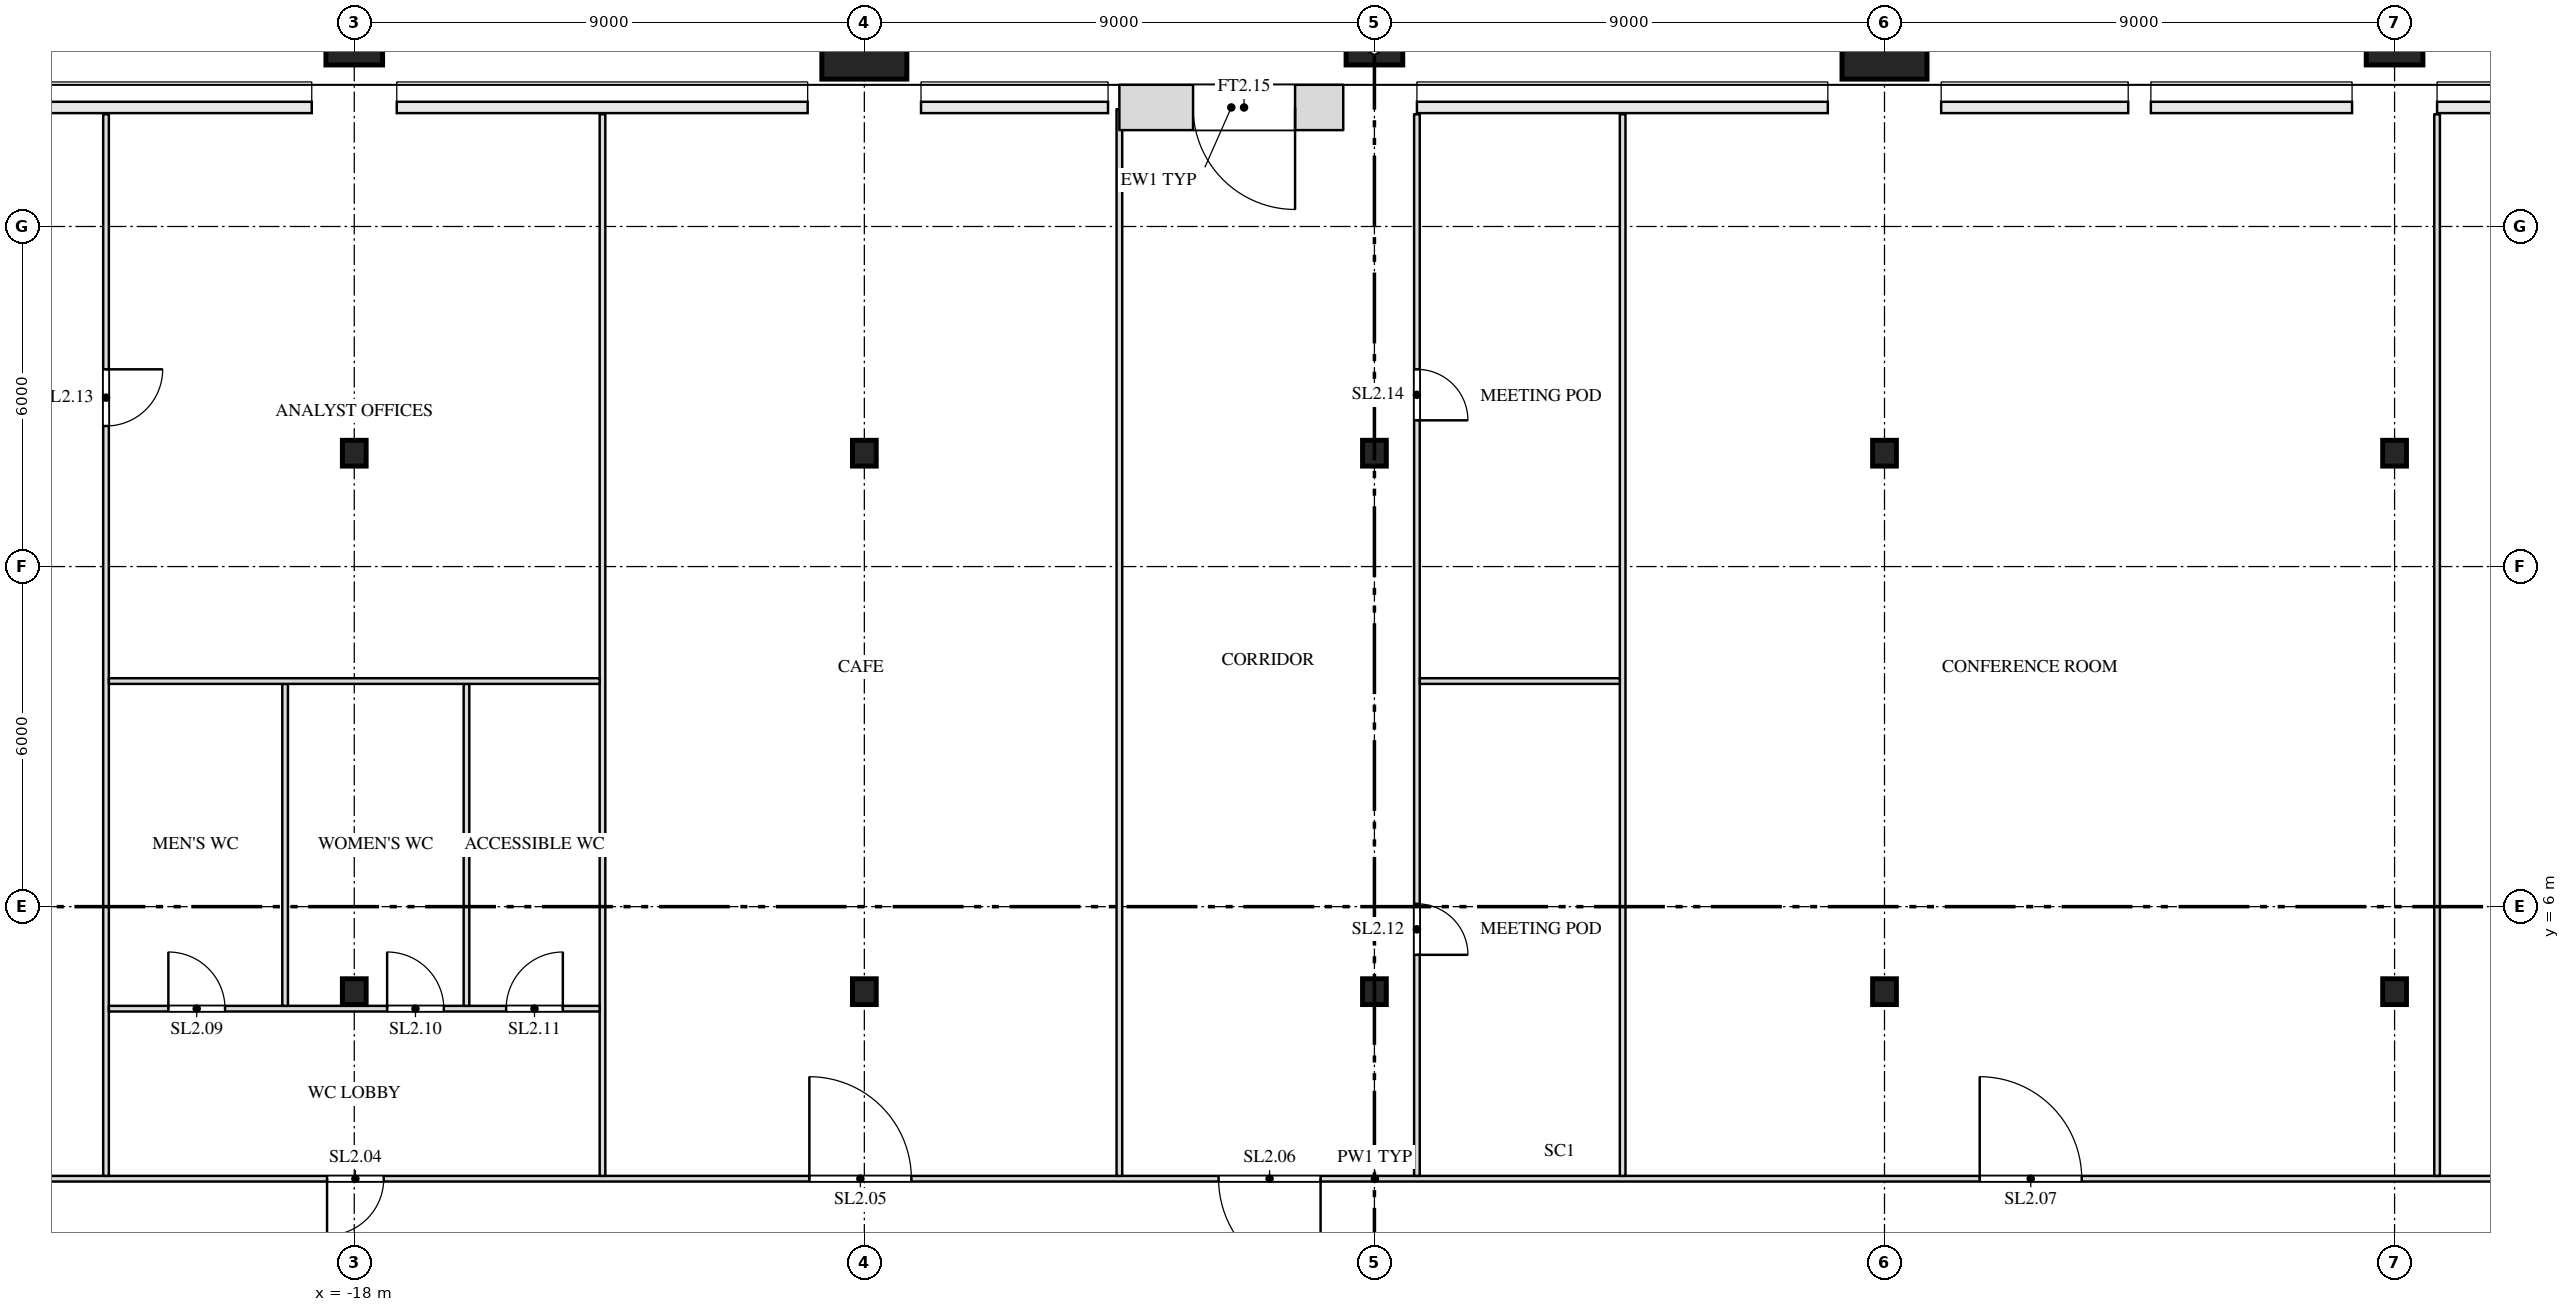
"""IFC4 building model, lengths in metres.
Left out: names, types, materials, properties, quantities, classifications, styles, units other than length and angle.
Written with IfcOpenShell. Run it as: python <this file> out.ifc"""

import sys

from ifc_helpers import new_model, si_unit, direction, frame, frame_2d, origin, origin_2d, place, context, subcontext, project, spatial, rectangle, i_section, extrude, clip, halfspace, element, fill, save


model = new_model("IFC4")
c1 = context("Model", 3, precision=1e-05, world=origin(), true_north=direction((0.0, 1.0)))
c2 = subcontext(c1, "Body", "Model", "MODEL_VIEW")
j1 = project(units=[si_unit("LENGTHUNIT", "METRE"), si_unit("PLANEANGLEUNIT", "RADIAN")], contexts=[c1])
p1 = place(None, origin())
s1 = spatial("IfcSite", under=j1, at=p1, CompositionType="ELEMENT")
p2 = place(p1, origin())
s2 = spatial("IfcBuilding", under=s1, at=p2, CompositionType="ELEMENT")
p3 = place(p2, frame((0.0, 0.0, 156.5)))
s3 = spatial("IfcBuildingStorey", under=s2, at=p3, CompositionType="ELEMENT", Elevation=156.5)
for number, where, z_axis, x_axis in (
    (1, (-18.0, 4.5, 0.0), (0.0, 0.0, 1.0), (1.0, 0.0, 0.0)),
    (2, (-9.0, 4.5, 0.0), (0.0, 0.0, 1.0), (1.0, 0.0, 0.0)),
    (3, (0.0, 4.5, 0.0), (0.0, 0.0, 1.0), (1.0, 0.0, 0.0)),
    (4, (9.0, 4.5, 0.0), (0.0, 0.0, 1.0), (1.0, 0.0, 0.0)),
    (5, (18.0, 4.5, 0.0), (0.0, 0.0, 1.0), (1.0, 0.0, 0.0)),
    (6, (-18.0, 14.0, 0.0), (0.0, 0.0, 1.0), (1.0, 0.0, 0.0)),
    (7, (-9.0, 14.0, 0.0), (0.0, 0.0, 1.0), (1.0, 0.0, 0.0)),
    (8, (0.0, 14.0, 0.0), (0.0, 0.0, 1.0), (1.0, 0.0, 0.0)),
    (9, (9.0, 14.0, 0.0), (0.0, 0.0, 1.0), (1.0, 0.0, 0.0)),
    (10, (18.0, 14.0, 0.0), (0.0, 0.0, 1.0), (1.0, 0.0, 0.0)),
):
    element("IfcColumn", number, at=place(p3, frame(where, z_axis=z_axis, x_axis=x_axis)), inside=s3, PredefinedType="COLUMN", context=c2, shape_type="SweptSolid", body=[
        extrude(i_section(OverallWidth=0.419, OverallDepth=0.455, WebThickness=0.042, FlangeThickness=0.068, at=origin_2d()), origin(), (0.0, 0.0, 1.0), 4.0),
    ])
p4 = place(p3, frame((-18.0, 20.0, 0.0), z_axis=(0.0, 0.747409318684, 0.66436383883), x_axis=(-1.0, 0.0, 0.0)))
e11 = element("IfcColumn", 11, at=p4, inside=s3, PredefinedType="COLUMN", context=c2, shape_type="Clipping", body=[
    clip(extrude(rectangle(XDim=1.0, YDim=1.0, at=origin_2d()), origin(), (0.0, 0.0, 1.0), 6.021), halfspace(frame((0.0, 0.0, 0.562)), True)),
])
p5 = place(p3, frame((-9.0, 20.0, 0.0), z_axis=(0.0, 0.747409318684, 0.66436383883), x_axis=(-1.0, 0.0, 0.0)))
e12 = element("IfcColumn", 12, at=p5, inside=s3, PredefinedType="COLUMN", context=c2, shape_type="Clipping", body=[
    clip(extrude(rectangle(XDim=1.5, YDim=1.5, at=origin_2d()), origin(), (0.0, 0.0, 1.0), 6.021), halfspace(frame((0.0, 0.0, 0.844)), True)),
])
p6 = place(p3, frame((0.0, 20.0, 0.0), z_axis=(0.0, 0.747409318684, 0.66436383883), x_axis=(-1.0, 0.0, 0.0)))
e13 = element("IfcColumn", 13, at=p6, inside=s3, PredefinedType="COLUMN", context=c2, shape_type="Clipping", body=[
    clip(extrude(rectangle(XDim=1.0, YDim=1.0, at=origin_2d()), origin(), (0.0, 0.0, 1.0), 6.021), halfspace(frame((0.0, 0.0, 0.562)), True)),
])
p7 = place(p3, frame((9.0, 20.0, 0.0), z_axis=(0.0, 0.747409318684, 0.66436383883), x_axis=(-1.0, 0.0, 0.0)))
e14 = element("IfcColumn", 14, at=p7, inside=s3, PredefinedType="COLUMN", context=c2, shape_type="Clipping", body=[
    clip(extrude(rectangle(XDim=1.5, YDim=1.5, at=origin_2d()), origin(), (0.0, 0.0, 1.0), 6.021), halfspace(frame((0.0, 0.0, 0.844)), True)),
])
p8 = place(p3, frame((18.0, 20.0, 0.0), z_axis=(0.0, 0.747409318684, 0.66436383883), x_axis=(-1.0, 0.0, 0.0)))
e15 = element("IfcColumn", 15, at=p8, inside=s3, PredefinedType="COLUMN", context=c2, shape_type="Clipping", body=[
    clip(extrude(rectangle(XDim=1.0, YDim=1.0, at=origin_2d()), origin(), (0.0, 0.0, 1.0), 6.021), halfspace(frame((0.0, 0.0, 0.562)), True)),
])
p9 = place(p3, frame((-33.98, 1.2, 0.0), z_axis=(0.0, 0.0, 1.0), x_axis=(1.0, 0.0, 0.0)))
e16 = element("IfcWall", 16, at=p9, inside=s3, PredefinedType="PARTITIONING", context=c2, shape_type="SweptSolid", body=[
    extrude(rectangle(XDim=67.976, YDim=0.1, at=frame_2d((33.988, 0.0))), origin(), (0.0, 0.0, 1.0), 3.65),
])
p10 = place(p9, frame((8.38, 0.0, 0.0)))
e17 = element("IfcOpeningElement", 17, at=p10, cuts=e16, PredefinedType="OPENING", context=c2, shape_type="SweptSolid", body=[
    extrude(rectangle(XDim=1.8, YDim=2.1, at=frame_2d((0.9, 1.05))), frame((0.0, 0.062, 0.0), z_axis=(0.0, -1.0, 0.0), x_axis=(1.0, 0.0, 0.0)), (0.0, 0.0, 1.0), 0.124),
])
p11 = place(p9, frame((15.5, 0.0, 0.0)))
e18 = element("IfcOpeningElement", 18, at=p11, cuts=e16, PredefinedType="OPENING", context=c2, shape_type="SweptSolid", body=[
    extrude(rectangle(XDim=1.0, YDim=2.1, at=frame_2d((0.5, 1.05))), frame((0.0, 0.062, 0.0), z_axis=(0.0, -1.0, 0.0), x_axis=(1.0, 0.0, 0.0)), (0.0, 0.0, 1.0), 0.124),
])
p12 = place(p9, frame((24.01, 0.0, 0.0)))
e19 = element("IfcOpeningElement", 19, at=p12, cuts=e16, PredefinedType="OPENING", context=c2, shape_type="SweptSolid", body=[
    extrude(rectangle(XDim=1.8, YDim=2.1, at=frame_2d((0.9, 1.05))), frame((0.0, 0.062, 0.0), z_axis=(0.0, -1.0, 0.0), x_axis=(1.0, 0.0, 0.0)), (0.0, 0.0, 1.0), 0.124),
])
p13 = place(p9, frame((31.23, 0.0, 0.0)))
e20 = element("IfcOpeningElement", 20, at=p13, cuts=e16, PredefinedType="OPENING", context=c2, shape_type="SweptSolid", body=[
    extrude(rectangle(XDim=1.8, YDim=2.1, at=frame_2d((0.9, 1.05))), frame((0.0, 0.062, 0.0), z_axis=(0.0, -1.0, 0.0), x_axis=(1.0, 0.0, 0.0)), (0.0, 0.0, 1.0), 0.124),
])
p14 = place(p9, frame((44.66, 0.0, 0.0)))
e21 = element("IfcOpeningElement", 21, at=p14, cuts=e16, PredefinedType="OPENING", context=c2, shape_type="SweptSolid", body=[
    extrude(rectangle(XDim=1.8, YDim=2.1, at=frame_2d((0.9, 1.05))), frame((0.0, 0.062, 0.0), z_axis=(0.0, -1.0, 0.0), x_axis=(1.0, 0.0, 0.0)), (0.0, 0.0, 1.0), 0.124),
])
p15 = place(p9, frame((55.93, 0.0, 0.0)))
e22 = element("IfcOpeningElement", 22, at=p15, cuts=e16, PredefinedType="OPENING", context=c2, shape_type="SweptSolid", body=[
    extrude(rectangle(XDim=1.8, YDim=2.1, at=frame_2d((0.9, 1.05))), frame((0.0, 0.062, 0.0), z_axis=(0.0, -1.0, 0.0), x_axis=(1.0, 0.0, 0.0)), (0.0, 0.0, 1.0), 0.124),
])
p16 = place(p3, frame((-22.38, 1.25, 0.0), z_axis=(0.0, 0.0, 1.0), x_axis=(0.0, 1.0, 0.0)))
e23 = element("IfcWall", 23, at=p16, inside=s3, PredefinedType="PARTITIONING", context=c2, shape_type="SweptSolid", body=[
    extrude(rectangle(XDim=18.73, YDim=0.1, at=frame_2d((9.365, 0.0))), origin(), (0.0, 0.0, 1.0), 3.65),
])
p17 = place(p16, frame((13.23, 0.0, 0.0)))
e24 = element("IfcOpeningElement", 24, at=p17, cuts=e23, PredefinedType="OPENING", context=c2, shape_type="SweptSolid", body=[
    extrude(rectangle(XDim=1.0, YDim=2.1, at=frame_2d((0.5, 1.05))), frame((0.0, 0.062, 0.0), z_axis=(0.0, -1.0, 0.0), x_axis=(1.0, 0.0, 0.0)), (0.0, 0.0, 1.0), 0.124),
])
p18 = place(p3, frame((-13.62, 1.25, 0.0), z_axis=(0.0, 0.0, 1.0), x_axis=(0.0, 1.0, 0.0)))
e25 = element("IfcWall", 25, at=p18, inside=s3, PredefinedType="PARTITIONING", context=c2, shape_type="SweptSolid", body=[
    extrude(rectangle(XDim=18.73, YDim=0.1, at=frame_2d((9.365, 0.0))), origin(), (0.0, 0.0, 1.0), 3.65),
])
p19 = place(p3, frame((-4.5, 1.25, 0.0), z_axis=(0.0, 0.0, 1.0), x_axis=(0.0, 1.0, 0.0)))
e26 = element("IfcWall", 26, at=p19, inside=s3, PredefinedType="PARTITIONING", context=c2, shape_type="SweptSolid", body=[
    extrude(rectangle(XDim=18.82, YDim=0.1, at=frame_2d((9.41, 0.0))), origin(), (0.0, 0.0, 1.0), 3.65),
])
p20 = place(p3, frame((0.75, 1.25, 0.0), z_axis=(0.0, 0.0, 1.0), x_axis=(0.0, 1.0, 0.0)))
e27 = element("IfcWall", 27, at=p20, inside=s3, PredefinedType="PARTITIONING", context=c2, shape_type="SweptSolid", body=[
    extrude(rectangle(XDim=18.73, YDim=0.1, at=frame_2d((9.365, 0.0))), origin(), (0.0, 0.0, 1.0), 3.65),
])
p21 = place(p20, frame((3.9, 0.0, 0.0)))
e28 = element("IfcOpeningElement", 28, at=p21, cuts=e27, PredefinedType="OPENING", context=c2, shape_type="SweptSolid", body=[
    extrude(rectangle(XDim=0.9, YDim=2.1, at=frame_2d((0.45, 1.05))), frame((0.0, 0.062, 0.0), z_axis=(0.0, -1.0, 0.0), x_axis=(1.0, 0.0, 0.0)), (0.0, 0.0, 1.0), 0.124),
])
p22 = place(p20, frame((13.33, 0.0, 0.0)))
e29 = element("IfcOpeningElement", 29, at=p22, cuts=e27, PredefinedType="OPENING", context=c2, shape_type="SweptSolid", body=[
    extrude(rectangle(XDim=0.9, YDim=2.1, at=frame_2d((0.45, 1.05))), frame((0.0, 0.062, 0.0), z_axis=(0.0, -1.0, 0.0), x_axis=(1.0, 0.0, 0.0)), (0.0, 0.0, 1.0), 0.124),
])
for number, where, z_axis, x_axis in (
    (30, (4.38, 1.25, 0.0), (0.0, 0.0, 1.0), (0.0, 1.0, 0.0)),
    (31, (18.75, 1.25, 0.0), (0.0, 0.0, 1.0), (0.0, 1.0, 0.0)),
):
    element("IfcWall", number, at=place(p3, frame(where, z_axis=z_axis, x_axis=x_axis)), inside=s3, PredefinedType="PARTITIONING", context=c2, shape_type="SweptSolid", body=[
        extrude(rectangle(XDim=18.73, YDim=0.1, at=frame_2d((9.365, 0.0))), origin(), (0.0, 0.0, 1.0), 3.65),
    ])
p23 = place(p3, frame((-22.33, 4.2, 0.0), z_axis=(0.0, 0.0, 1.0), x_axis=(1.0, 0.0, 0.0)))
e32 = element("IfcWall", 32, at=p23, inside=s3, PredefinedType="PARTITIONING", context=c2, shape_type="SweptSolid", body=[
    extrude(rectangle(XDim=8.66, YDim=0.1, at=frame_2d((4.33, 0.0))), origin(), (0.0, 0.0, 1.0), 3.65),
])
p24 = place(p23, frame((1.05, 0.0, 0.0)))
e33 = element("IfcOpeningElement", 33, at=p24, cuts=e32, PredefinedType="OPENING", context=c2, shape_type="SweptSolid", body=[
    extrude(rectangle(XDim=1.0, YDim=2.1, at=frame_2d((0.5, 1.05))), frame((0.0, 0.062, 0.0), z_axis=(0.0, -1.0, 0.0), x_axis=(1.0, 0.0, 0.0)), (0.0, 0.0, 1.0), 0.124),
])
p25 = place(p23, frame((4.91, 0.0, 0.0)))
e34 = element("IfcOpeningElement", 34, at=p25, cuts=e32, PredefinedType="OPENING", context=c2, shape_type="SweptSolid", body=[
    extrude(rectangle(XDim=1.0, YDim=2.1, at=frame_2d((0.5, 1.05))), frame((0.0, 0.062, 0.0), z_axis=(0.0, -1.0, 0.0), x_axis=(1.0, 0.0, 0.0)), (0.0, 0.0, 1.0), 0.124),
])
p26 = place(p23, frame((7.01, 0.0, 0.0)))
e35 = element("IfcOpeningElement", 35, at=p26, cuts=e32, PredefinedType="OPENING", context=c2, shape_type="SweptSolid", body=[
    extrude(rectangle(XDim=1.0, YDim=2.1, at=frame_2d((0.5, 1.05))), frame((0.0, 0.062, 0.0), z_axis=(0.0, -1.0, 0.0), x_axis=(1.0, 0.0, 0.0)), (0.0, 0.0, 1.0), 0.124),
])
for number, where, z_axis, x_axis in (
    (36, (-19.22, 4.25, 0.0), (0.0, 0.0, 1.0), (0.0, 1.0, 0.0)),
    (37, (-16.02, 4.25, 0.0), (0.0, 0.0, 1.0), (0.0, 1.0, 0.0)),
):
    element("IfcWall", number, at=place(p3, frame(where, z_axis=z_axis, x_axis=x_axis)), inside=s3, PredefinedType="PARTITIONING", context=c2, shape_type="SweptSolid", body=[
        extrude(rectangle(XDim=5.68, YDim=0.1, at=frame_2d((2.84, 0.0))), origin(), (0.0, 0.0, 1.0), 3.65),
    ])
p27 = place(p3, frame((-22.33, 9.98, 0.0), z_axis=(0.0, 0.0, 1.0), x_axis=(1.0, 0.0, 0.0)))
e38 = element("IfcWall", 38, at=p27, inside=s3, PredefinedType="PARTITIONING", context=c2, shape_type="SweptSolid", body=[
    extrude(rectangle(XDim=8.66, YDim=0.1, at=frame_2d((4.33, 0.0))), origin(), (0.0, 0.0, 1.0), 3.65),
])
p28 = place(p3, frame((0.8, 9.98, 0.0), z_axis=(0.0, 0.0, 1.0), x_axis=(1.0, 0.0, 0.0)))
e39 = element("IfcWall", 39, at=p28, inside=s3, PredefinedType="PARTITIONING", context=c2, shape_type="SweptSolid", body=[
    extrude(rectangle(XDim=3.53, YDim=0.1, at=frame_2d((1.765, 0.0))), origin(), (0.0, 0.0, 1.0), 3.65),
])
p29 = place(p3, frame((-0.55, 20.1, 0.0), z_axis=(0.0, 0.0, 1.0), x_axis=(-1.0, 0.0, 0.0)))
e40 = element("IfcWall", 40, at=p29, inside=s3, PredefinedType="SOLIDWALL", context=c2, shape_type="SweptSolid", body=[
    extrude(rectangle(XDim=3.95, YDim=0.8, at=frame_2d((1.975, 0.0))), origin(), (0.0, 0.0, 1.0), 3.65),
])
p30 = place(p29, frame((0.85, 0.0, 0.0)))
e41 = element("IfcOpeningElement", 41, at=p30, cuts=e40, PredefinedType="OPENING", context=c2, shape_type="SweptSolid", body=[
    extrude(rectangle(XDim=1.8, YDim=2.4, at=frame_2d((0.9, 1.2))), frame((0.0, 0.412, 0.0), z_axis=(0.0, -1.0, 0.0), x_axis=(1.0, 0.0, 0.0)), (0.0, 0.0, 1.0), 0.824),
])
p31 = place(p11, origin())
e42 = element("IfcDoor", 42, at=p31, inside=s3, OperationType="SINGLE_SWING_RIGHT", PredefinedType="DOOR", context=c2, shape_type="SweptSolid", body=[
    extrude(rectangle(XDim=1.0, YDim=2.1, at=frame_2d((0.5, 1.05))), frame((0.0, 0.025, 0.0), z_axis=(0.0, -1.0, 0.0), x_axis=(1.0, 0.0, 0.0)), (0.0, 0.0, 1.0), 0.05),
])
fill(e18, e42)
p32 = place(p12, origin())
e43 = element("IfcDoor", 43, at=p32, inside=s3, OperationType="DOUBLE_DOOR_SINGLE_SWING", PredefinedType="DOOR", context=c2, shape_type="SweptSolid", body=[
    extrude(rectangle(XDim=1.8, YDim=2.1, at=frame_2d((0.9, 1.05))), frame((0.0, 0.025, 0.0), z_axis=(0.0, -1.0, 0.0), x_axis=(1.0, 0.0, 0.0)), (0.0, 0.0, 1.0), 0.05),
])
fill(e19, e43)
p33 = place(p13, origin())
e44 = element("IfcDoor", 44, at=p33, inside=s3, OperationType="DOUBLE_DOOR_SINGLE_SWING", PredefinedType="DOOR", context=c2, shape_type="SweptSolid", body=[
    extrude(rectangle(XDim=1.8, YDim=2.1, at=frame_2d((0.9, 1.05))), frame((0.0, 0.025, 0.0), z_axis=(0.0, -1.0, 0.0), x_axis=(1.0, 0.0, 0.0)), (0.0, 0.0, 1.0), 0.05),
])
fill(e20, e44)
p34 = place(p14, origin())
e45 = element("IfcDoor", 45, at=p34, inside=s3, OperationType="DOUBLE_DOOR_SINGLE_SWING", PredefinedType="DOOR", context=c2, shape_type="SweptSolid", body=[
    extrude(rectangle(XDim=1.8, YDim=2.1, at=frame_2d((0.9, 1.05))), frame((0.0, 0.025, 0.0), z_axis=(0.0, -1.0, 0.0), x_axis=(1.0, 0.0, 0.0)), (0.0, 0.0, 1.0), 0.05),
])
fill(e21, e45)
p35 = place(p24, origin())
e46 = element("IfcDoor", 46, at=p35, inside=s3, OperationType="SINGLE_SWING_LEFT", PredefinedType="DOOR", context=c2, shape_type="SweptSolid", body=[
    extrude(rectangle(XDim=1.0, YDim=2.1, at=frame_2d((0.5, 1.05))), frame((0.0, 0.025, 0.0), z_axis=(0.0, -1.0, 0.0), x_axis=(1.0, 0.0, 0.0)), (0.0, 0.0, 1.0), 0.05),
])
fill(e33, e46)
p36 = place(p25, origin())
e47 = element("IfcDoor", 47, at=p36, inside=s3, OperationType="SINGLE_SWING_LEFT", PredefinedType="DOOR", context=c2, shape_type="SweptSolid", body=[
    extrude(rectangle(XDim=1.0, YDim=2.1, at=frame_2d((0.5, 1.05))), frame((0.0, 0.025, 0.0), z_axis=(0.0, -1.0, 0.0), x_axis=(1.0, 0.0, 0.0)), (0.0, 0.0, 1.0), 0.05),
])
fill(e34, e47)
p37 = place(p26, origin())
e48 = element("IfcDoor", 48, at=p37, inside=s3, OperationType="SINGLE_SWING_RIGHT", PredefinedType="DOOR", context=c2, shape_type="SweptSolid", body=[
    extrude(rectangle(XDim=1.0, YDim=2.1, at=frame_2d((0.5, 1.05))), frame((0.0, 0.025, 0.0), z_axis=(0.0, -1.0, 0.0), x_axis=(1.0, 0.0, 0.0)), (0.0, 0.0, 1.0), 0.05),
])
fill(e35, e48)
p38 = place(p21, origin())
e49 = element("IfcDoor", 49, at=p38, inside=s3, OperationType="SINGLE_SWING_RIGHT", PredefinedType="DOOR", context=c2, shape_type="SweptSolid", body=[
    extrude(rectangle(XDim=0.9, YDim=2.1, at=frame_2d((0.45, 1.05))), frame((0.0, 0.025, 0.0), z_axis=(0.0, -1.0, 0.0), x_axis=(1.0, 0.0, 0.0)), (0.0, 0.0, 1.0), 0.05),
])
fill(e28, e49)
p39 = place(p17, origin())
e50 = element("IfcDoor", 50, at=p39, inside=s3, OperationType="SINGLE_SWING_LEFT", PredefinedType="DOOR", context=c2, shape_type="SweptSolid", body=[
    extrude(rectangle(XDim=1.0, YDim=2.1, at=frame_2d((0.5, 1.05))), frame((0.0, 0.025, 0.0), z_axis=(0.0, -1.0, 0.0), x_axis=(1.0, 0.0, 0.0)), (0.0, 0.0, 1.0), 0.05),
])
fill(e24, e50)
p40 = place(p22, origin())
e51 = element("IfcDoor", 51, at=p40, inside=s3, OperationType="SINGLE_SWING_RIGHT", PredefinedType="DOOR", context=c2, shape_type="SweptSolid", body=[
    extrude(rectangle(XDim=0.9, YDim=2.1, at=frame_2d((0.45, 1.05))), frame((0.0, 0.025, 0.0), z_axis=(0.0, -1.0, 0.0), x_axis=(1.0, 0.0, 0.0)), (0.0, 0.0, 1.0), 0.05),
])
fill(e29, e51)
p41 = place(p30, origin())
e52 = element("IfcDoor", 52, at=p41, inside=s3, OperationType="DOUBLE_DOOR_SINGLE_SWING", PredefinedType="DOOR", context=c2, shape_type="SweptSolid", body=[
    extrude(rectangle(XDim=1.8, YDim=2.4, at=frame_2d((0.9, 1.2))), frame((0.0, 0.025, 0.0), z_axis=(0.0, -1.0, 0.0), x_axis=(1.0, 0.0, 0.0)), (0.0, 0.0, 1.0), 0.05),
])
fill(e41, e52)
save(model, sys.argv[1])
